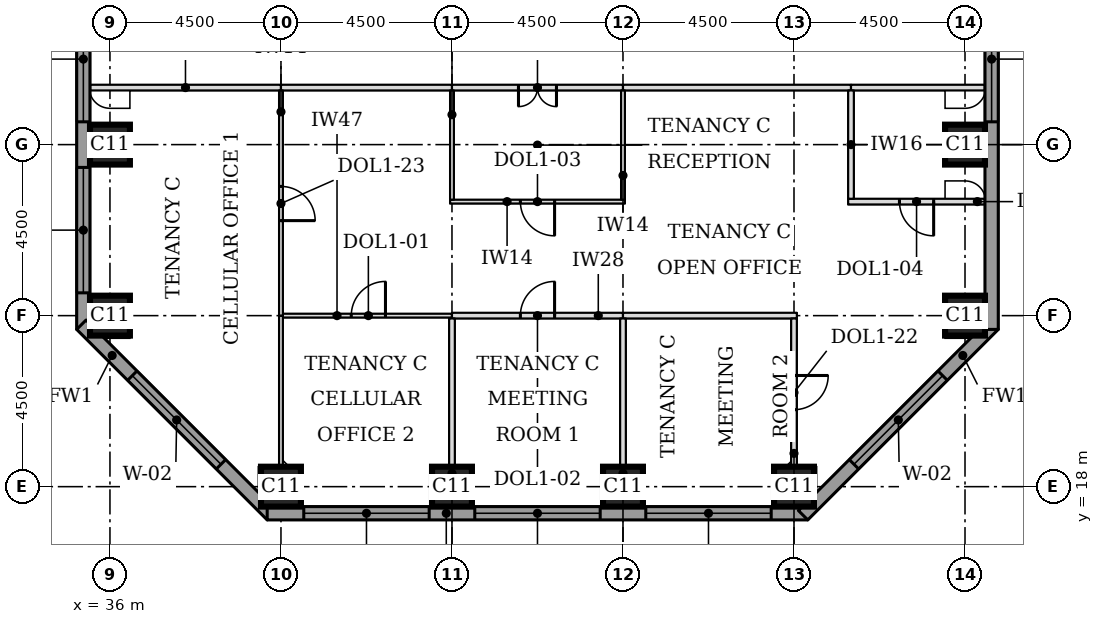
"""IFC4 building model, lengths in metres.
Left out: names, types, materials, properties, quantities, classifications, styles, units other than length and angle.
Written with IfcOpenShell. Run it as: python <this file> out.ifc"""

import sys

from ifc_helpers import new_model, si_unit, direction, frame, frame_2d, origin, origin_2d, place, context, subcontext, project, spatial, rectangle, extrude, element, fill, save


model = new_model("IFC4")
c1 = context("Model", 3, precision=1e-05, world=origin(), true_north=direction((0.0, 1.0)))
c2 = subcontext(c1, "Body", "Model", "MODEL_VIEW")
j1 = project(units=[si_unit("LENGTHUNIT", "METRE"), si_unit("PLANEANGLEUNIT", "RADIAN")], contexts=[c1])
p1 = place(None, origin())
s1 = spatial("IfcSite", under=j1, at=p1, CompositionType="ELEMENT")
p2 = place(p1, origin())
s2 = spatial("IfcBuilding", under=s1, at=p2, CompositionType="ELEMENT")
p3 = place(p2, frame((0.0, 0.0, 78.9)))
s3 = spatial("IfcBuildingStorey", under=s2, at=p3, CompositionType="ELEMENT", Elevation=78.9)
for number, where, z_axis, x_axis in (
    (1, (40.5, 18.0, 0.0), (0.0, 0.0, 1.0), (1.0, 0.0, 0.0)),
    (2, (45.0, 18.0, 0.0), (0.0, 0.0, 1.0), (1.0, 0.0, 0.0)),
    (3, (49.5, 18.0, 0.0), (0.0, 0.0, 1.0), (1.0, 0.0, 0.0)),
    (4, (54.0, 18.0, 0.0), (0.0, 0.0, 1.0), (1.0, 0.0, 0.0)),
    (5, (36.0, 22.5, 0.0), (0.0, 0.0, 1.0), (1.0, 0.0, 0.0)),
    (6, (58.5, 22.5, 0.0), (0.0, 0.0, 1.0), (1.0, 0.0, 0.0)),
    (7, (36.0, 27.0, 0.0), (0.0, 0.0, 1.0), (1.0, 0.0, 0.0)),
    (8, (58.5, 27.0, 0.0), (0.0, 0.0, 1.0), (1.0, 0.0, 0.0)),
):
    element("IfcColumn", number, at=place(p3, frame(where, z_axis=z_axis, x_axis=x_axis)), inside=s3, PredefinedType="COLUMN", context=c2, shape_type="SweptSolid", body=[
        extrude(rectangle(XDim=1.05, YDim=1.05, at=origin_2d()), origin(), (0.0, 0.0, 1.0), 3.7),
    ])
p4 = place(p3, frame((35.3, 39.975, 0.0), z_axis=(0.0, 0.0, 1.0), x_axis=(0.0, -1.0, 0.0)))
e9 = element("IfcWall", 9, at=p4, inside=s3, PredefinedType="STANDARD", context=c2, shape_type="SweptSolid", body=[
    extrude(rectangle(XDim=17.837, YDim=0.35, at=frame_2d((8.919, 0.0))), origin(), (0.0, 0.0, 1.0), 3.525),
])
p5 = place(p4, frame((0.5, 0.0, 0.9)))
e10 = element("IfcOpeningElement", 10, at=p5, cuts=e9, PredefinedType="OPENING", context=c2, shape_type="SweptSolid", body=[
    extrude(rectangle(XDim=3.3, YDim=1.9, at=frame_2d((1.65, 0.95))), frame((0.0, 0.185, 0.0), z_axis=(0.0, -1.0, 0.0), x_axis=(1.0, 0.0, 0.0)), (0.0, 0.0, 1.0), 0.37),
])
p6 = place(p4, frame((4.575, 0.0, 0.9)))
e11 = element("IfcOpeningElement", 11, at=p6, cuts=e9, PredefinedType="OPENING", context=c2, shape_type="SweptSolid", body=[
    extrude(rectangle(XDim=3.3, YDim=1.9, at=frame_2d((1.65, 0.95))), frame((0.0, 0.185, 0.0), z_axis=(0.0, -1.0, 0.0), x_axis=(1.0, 0.0, 0.0)), (0.0, 0.0, 1.0), 0.37),
])
p7 = place(p4, frame((9.075, 0.0, 0.9)))
e12 = element("IfcOpeningElement", 12, at=p7, cuts=e9, PredefinedType="OPENING", context=c2, shape_type="SweptSolid", body=[
    extrude(rectangle(XDim=3.3, YDim=1.9, at=frame_2d((1.65, 0.95))), frame((0.0, 0.185, 0.0), z_axis=(0.0, -1.0, 0.0), x_axis=(1.0, 0.0, 0.0)), (0.0, 0.0, 1.0), 0.37),
])
p8 = place(p4, frame((13.575, 0.0, 0.9)))
e13 = element("IfcOpeningElement", 13, at=p8, cuts=e9, PredefinedType="OPENING", context=c2, shape_type="SweptSolid", body=[
    extrude(rectangle(XDim=3.3, YDim=1.9, at=frame_2d((1.65, 0.95))), frame((0.0, 0.185, 0.0), z_axis=(0.0, -1.0, 0.0), x_axis=(1.0, 0.0, 0.0)), (0.0, 0.0, 1.0), 0.37),
])
p9 = place(p3, frame((35.249, 22.261, 0.0), z_axis=(0.0, 0.0, 1.0), x_axis=(0.707106781187, -0.707106781187, 0.0)))
e14 = element("IfcWall", 14, at=p9, inside=s3, PredefinedType="STANDARD", context=c2, shape_type="SweptSolid", body=[
    extrude(rectangle(XDim=7.089, YDim=0.35, at=frame_2d((3.544, 0.0))), origin(), (0.0, 0.0, 1.0), 3.525),
])
p10 = place(p9, frame((1.894, 0.0, 0.9)))
e15 = element("IfcOpeningElement", 15, at=p10, cuts=e14, PredefinedType="OPENING", context=c2, shape_type="SweptSolid", body=[
    extrude(rectangle(XDim=3.3, YDim=1.9, at=frame_2d((1.65, 0.95))), frame((0.0, 0.185, 0.0), z_axis=(0.0, -1.0, 0.0), x_axis=(1.0, 0.0, 0.0)), (0.0, 0.0, 1.0), 0.37),
])
p11 = place(p3, frame((40.138, 17.3, 0.0), z_axis=(0.0, 0.0, 1.0), x_axis=(1.0, 0.0, 0.0)))
e16 = element("IfcWall", 16, at=p11, inside=s3, PredefinedType="STANDARD", context=c2, shape_type="SweptSolid", body=[
    extrude(rectangle(XDim=14.225, YDim=0.35, at=frame_2d((7.112, 0.0))), origin(), (0.0, 0.0, 1.0), 3.525),
])
p12 = place(p11, frame((0.962, 0.0, 0.9)))
e17 = element("IfcOpeningElement", 17, at=p12, cuts=e16, PredefinedType="OPENING", context=c2, shape_type="SweptSolid", body=[
    extrude(rectangle(XDim=3.3, YDim=1.9, at=frame_2d((1.65, 0.95))), frame((0.0, 0.185, 0.0), z_axis=(0.0, -1.0, 0.0), x_axis=(1.0, 0.0, 0.0)), (0.0, 0.0, 1.0), 0.37),
])
p13 = place(p11, frame((5.462, 0.0, 0.9)))
e18 = element("IfcOpeningElement", 18, at=p13, cuts=e16, PredefinedType="OPENING", context=c2, shape_type="SweptSolid", body=[
    extrude(rectangle(XDim=3.3, YDim=1.9, at=frame_2d((1.65, 0.95))), frame((0.0, 0.185, 0.0), z_axis=(0.0, -1.0, 0.0), x_axis=(1.0, 0.0, 0.0)), (0.0, 0.0, 1.0), 0.37),
])
p14 = place(p11, frame((9.962, 0.0, 0.9)))
e19 = element("IfcOpeningElement", 19, at=p14, cuts=e16, PredefinedType="OPENING", context=c2, shape_type="SweptSolid", body=[
    extrude(rectangle(XDim=3.3, YDim=1.9, at=frame_2d((1.65, 0.95))), frame((0.0, 0.185, 0.0), z_axis=(0.0, -1.0, 0.0), x_axis=(1.0, 0.0, 0.0)), (0.0, 0.0, 1.0), 0.37),
])
p15 = place(p3, frame((54.239, 17.249, 0.0), z_axis=(0.0, 0.0, 1.0), x_axis=(0.707106781187, 0.707106781187, 0.0)))
e20 = element("IfcWall", 20, at=p15, inside=s3, PredefinedType="STANDARD", context=c2, shape_type="SweptSolid", body=[
    extrude(rectangle(XDim=7.089, YDim=0.35, at=frame_2d((3.544, 0.0))), origin(), (0.0, 0.0, 1.0), 3.525),
])
p16 = place(p15, frame((1.894, 0.0, 0.9)))
e21 = element("IfcOpeningElement", 21, at=p16, cuts=e20, PredefinedType="OPENING", context=c2, shape_type="SweptSolid", body=[
    extrude(rectangle(XDim=3.3, YDim=1.9, at=frame_2d((1.65, 0.95))), frame((0.0, 0.185, 0.0), z_axis=(0.0, -1.0, 0.0), x_axis=(1.0, 0.0, 0.0)), (0.0, 0.0, 1.0), 0.37),
])
p17 = place(p3, frame((59.2, 22.138, 0.0), z_axis=(0.0, 0.0, 1.0), x_axis=(0.0, 1.0, 0.0)))
e22 = element("IfcWall", 22, at=p17, inside=s3, PredefinedType="STANDARD", context=c2, shape_type="SweptSolid", body=[
    extrude(rectangle(XDim=17.837, YDim=0.35, at=frame_2d((8.919, 0.0))), origin(), (0.0, 0.0, 1.0), 3.525),
])
p18 = place(p17, frame((5.462, 0.0, 0.9)))
e23 = element("IfcOpeningElement", 23, at=p18, cuts=e22, PredefinedType="OPENING", context=c2, shape_type="SweptSolid", body=[
    extrude(rectangle(XDim=3.3, YDim=1.9, at=frame_2d((1.65, 0.95))), frame((0.0, 0.185, 0.0), z_axis=(0.0, -1.0, 0.0), x_axis=(1.0, 0.0, 0.0)), (0.0, 0.0, 1.0), 0.37),
])
p19 = place(p17, frame((14.037, 0.0, 0.9)))
e24 = element("IfcOpeningElement", 24, at=p19, cuts=e22, PredefinedType="OPENING", context=c2, shape_type="SweptSolid", body=[
    extrude(rectangle(XDim=3.3, YDim=1.9, at=frame_2d((1.65, 0.95))), frame((0.0, 0.185, 0.0), z_axis=(0.0, -1.0, 0.0), x_axis=(1.0, 0.0, 0.0)), (0.0, 0.0, 1.0), 0.37),
])
p20 = place(p3, frame((40.55, 22.5, 0.0), z_axis=(0.0, 0.0, 1.0), x_axis=(1.0, 0.0, 0.0)))
e25 = element("IfcWall", 25, at=p20, inside=s3, PredefinedType="PARTITIONING", context=c2, shape_type="SweptSolid", body=[
    extrude(rectangle(XDim=4.45, YDim=0.1, at=frame_2d((2.225, 0.0))), origin(), (0.0, 0.0, 1.0), 2.55),
])
p21 = place(p20, frame((1.8, 0.0, 0.0)))
e26 = element("IfcOpeningElement", 26, at=p21, cuts=e25, PredefinedType="OPENING", context=c2, shape_type="SweptSolid", body=[
    extrude(rectangle(XDim=0.9, YDim=2.1, at=frame_2d((0.45, 1.05))), frame((0.0, 0.06, 0.0), z_axis=(0.0, -1.0, 0.0), x_axis=(1.0, 0.0, 0.0)), (0.0, 0.0, 1.0), 0.12),
])
p22 = place(p3, frame((45.0, 22.5, 0.0), z_axis=(0.0, 0.0, 1.0), x_axis=(1.0, 0.0, 0.0)))
e27 = element("IfcWall", 27, at=p22, inside=s3, PredefinedType="PARTITIONING", context=c2, shape_type="SweptSolid", body=[
    extrude(rectangle(XDim=4.5, YDim=0.15, at=frame_2d((2.25, 0.0))), origin(), (0.0, 0.0, 1.0), 2.55),
])
p23 = place(p22, frame((1.8, 0.0, 0.0)))
e28 = element("IfcOpeningElement", 28, at=p23, cuts=e27, PredefinedType="OPENING", context=c2, shape_type="SweptSolid", body=[
    extrude(rectangle(XDim=0.9, YDim=2.1, at=frame_2d((0.45, 1.05))), frame((0.0, 0.085, 0.0), z_axis=(0.0, -1.0, 0.0), x_axis=(1.0, 0.0, 0.0)), (0.0, 0.0, 1.0), 0.17),
])
p24 = place(p3, frame((49.5, 22.5, 0.0), z_axis=(0.0, 0.0, 1.0), x_axis=(1.0, 0.0, 0.0)))
e29 = element("IfcWall", 29, at=p24, inside=s3, PredefinedType="PARTITIONING", context=c2, shape_type="SweptSolid", body=[
    extrude(rectangle(XDim=4.575, YDim=0.15, at=frame_2d((2.288, 0.0))), origin(), (0.0, 0.0, 1.0), 2.55),
])
p25 = place(p3, frame((44.95, 25.5, 0.0), z_axis=(0.0, 0.0, 1.0), x_axis=(1.0, 0.0, 0.0)))
e30 = element("IfcWall", 30, at=p25, inside=s3, PredefinedType="PARTITIONING", context=c2, shape_type="SweptSolid", body=[
    extrude(rectangle(XDim=4.6, YDim=0.1, at=frame_2d((2.3, 0.0))), origin(), (0.0, 0.0, 1.0), 3.55),
])
p26 = place(p25, frame((1.85, 0.0, 0.0)))
e31 = element("IfcOpeningElement", 31, at=p26, cuts=e30, PredefinedType="OPENING", context=c2, shape_type="SweptSolid", body=[
    extrude(rectangle(XDim=0.9, YDim=2.1, at=frame_2d((0.45, 1.05))), frame((0.0, 0.06, 0.0), z_axis=(0.0, -1.0, 0.0), x_axis=(1.0, 0.0, 0.0)), (0.0, 0.0, 1.0), 0.12),
])
p27 = place(p3, frame((55.425, 25.5, 0.0), z_axis=(0.0, 0.0, 1.0), x_axis=(1.0, 0.0, 0.0)))
e32 = element("IfcWall", 32, at=p27, inside=s3, PredefinedType="PARTITIONING", context=c2, shape_type="SweptSolid", body=[
    extrude(rectangle(XDim=3.6, YDim=0.15, at=frame_2d((1.8, 0.0))), origin(), (0.0, 0.0, 1.0), 3.55),
])
p28 = place(p27, frame((1.35, 0.0, 0.0)))
e33 = element("IfcOpeningElement", 33, at=p28, cuts=e32, PredefinedType="OPENING", context=c2, shape_type="SweptSolid", body=[
    extrude(rectangle(XDim=0.9, YDim=2.1, at=frame_2d((0.45, 1.05))), frame((0.0, 0.085, 0.0), z_axis=(0.0, -1.0, 0.0), x_axis=(1.0, 0.0, 0.0)), (0.0, 0.0, 1.0), 0.17),
])
p29 = place(p3, frame((35.475, 28.5, 0.0), z_axis=(0.0, 0.0, 1.0), x_axis=(1.0, 0.0, 0.0)))
e34 = element("IfcWall", 34, at=p29, inside=s3, PredefinedType="PARTITIONING", context=c2, shape_type="SweptSolid", body=[
    extrude(rectangle(XDim=5.025, YDim=0.15, at=frame_2d((2.512, 0.0))), origin(), (0.0, 0.0, 1.0), 3.55),
])
p30 = place(p3, frame((40.5, 28.5, 0.0), z_axis=(0.0, 0.0, 1.0), x_axis=(1.0, 0.0, 0.0)))
e35 = element("IfcWall", 35, at=p30, inside=s3, PredefinedType="PARTITIONING", context=c2, shape_type="SweptSolid", body=[
    extrude(rectangle(XDim=4.5, YDim=0.15, at=frame_2d((2.25, 0.0))), origin(), (0.0, 0.0, 1.0), 3.55),
])
p31 = place(p3, frame((45.0, 28.5, 0.0), z_axis=(0.0, 0.0, 1.0), x_axis=(1.0, 0.0, 0.0)))
e36 = element("IfcWall", 36, at=p31, inside=s3, PredefinedType="PARTITIONING", context=c2, shape_type="SweptSolid", body=[
    extrude(rectangle(XDim=4.5, YDim=0.15, at=frame_2d((2.25, 0.0))), origin(), (0.0, 0.0, 1.0), 3.55),
])
p32 = place(p31, frame((1.75, 0.0, 0.0)))
e37 = element("IfcOpeningElement", 37, at=p32, cuts=e36, PredefinedType="OPENING", context=c2, shape_type="SweptSolid", body=[
    extrude(rectangle(XDim=1.0, YDim=2.1, at=frame_2d((0.5, 1.05))), frame((0.0, 0.085, 0.0), z_axis=(0.0, -1.0, 0.0), x_axis=(1.0, 0.0, 0.0)), (0.0, 0.0, 1.0), 0.17),
])
p33 = place(p3, frame((49.5, 28.5, 0.0), z_axis=(0.0, 0.0, 1.0), x_axis=(1.0, 0.0, 0.0)))
e38 = element("IfcWall", 38, at=p33, inside=s3, PredefinedType="PARTITIONING", context=c2, shape_type="SweptSolid", body=[
    extrude(rectangle(XDim=6.0, YDim=0.15, at=frame_2d((3.0, 0.0))), origin(), (0.0, 0.0, 1.0), 3.55),
])
p34 = place(p3, frame((55.5, 28.5, 0.0), z_axis=(0.0, 0.0, 1.0), x_axis=(1.0, 0.0, 0.0)))
e39 = element("IfcWall", 39, at=p34, inside=s3, PredefinedType="PARTITIONING", context=c2, shape_type="SweptSolid", body=[
    extrude(rectangle(XDim=3.525, YDim=0.15, at=frame_2d((1.762, 0.0))), origin(), (0.0, 0.0, 1.0), 3.55),
])
for number, where, z_axis, x_axis in (
    (40, (45.0, 17.475, 0.0), (0.0, 0.0, 1.0), (0.0, 1.0, 0.0)),
    (41, (49.5, 17.475, 0.0), (0.0, 0.0, 1.0), (0.0, 1.0, 0.0)),
):
    element("IfcWall", number, at=place(p3, frame(where, z_axis=z_axis, x_axis=x_axis)), inside=s3, PredefinedType="PARTITIONING", context=c2, shape_type="SweptSolid", body=[
        extrude(rectangle(XDim=4.95, YDim=0.15, at=frame_2d((2.475, 0.0))), origin(), (0.0, 0.0, 1.0), 3.55),
    ])
p35 = place(p3, frame((40.5, 18.525, 0.0), z_axis=(0.0, 0.0, 1.0), x_axis=(0.0, 1.0, 0.0)))
e42 = element("IfcWall", 42, at=p35, inside=s3, PredefinedType="PARTITIONING", context=c2, shape_type="SweptSolid", body=[
    extrude(rectangle(XDim=3.975, YDim=0.1, at=frame_2d((1.988, 0.0))), origin(), (0.0, 0.0, 1.0), 3.55),
])
p36 = place(p3, frame((54.0, 18.525, 0.0), z_axis=(0.0, 0.0, 1.0), x_axis=(0.0, 1.0, 0.0)))
e43 = element("IfcWall", 43, at=p36, inside=s3, PredefinedType="PARTITIONING", context=c2, shape_type="SweptSolid", body=[
    extrude(rectangle(XDim=3.9, YDim=0.15, at=frame_2d((1.95, 0.0))), origin(), (0.0, 0.0, 1.0), 3.55),
])
p37 = place(p36, frame((1.5, 0.0, 0.0)))
e44 = element("IfcOpeningElement", 44, at=p37, cuts=e43, PredefinedType="OPENING", context=c2, shape_type="SweptSolid", body=[
    extrude(rectangle(XDim=0.9, YDim=2.1, at=frame_2d((0.45, 1.05))), frame((0.0, 0.085, 0.0), z_axis=(0.0, -1.0, 0.0), x_axis=(1.0, 0.0, 0.0)), (0.0, 0.0, 1.0), 0.17),
])
p38 = place(p3, frame((40.5, 22.5, 0.0), z_axis=(0.0, 0.0, 1.0), x_axis=(0.0, 1.0, 0.0)))
e45 = element("IfcWall", 45, at=p38, inside=s3, PredefinedType="PARTITIONING", context=c2, shape_type="SweptSolid", body=[
    extrude(rectangle(XDim=5.925, YDim=0.1, at=frame_2d((2.962, 0.0))), origin(), (0.0, 0.0, 1.0), 3.55),
])
p39 = place(p38, frame((2.5, 0.0, 0.0)))
e46 = element("IfcOpeningElement", 46, at=p39, cuts=e45, PredefinedType="OPENING", context=c2, shape_type="SweptSolid", body=[
    extrude(rectangle(XDim=0.9, YDim=2.1, at=frame_2d((0.45, 1.05))), frame((0.0, 0.06, 0.0), z_axis=(0.0, -1.0, 0.0), x_axis=(1.0, 0.0, 0.0)), (0.0, 0.0, 1.0), 0.12),
])
for number, where, z_axis, x_axis in (
    (47, (45.0, 25.55, 0.0), (0.0, 0.0, 1.0), (0.0, 1.0, 0.0)),
    (48, (49.5, 25.55, 0.0), (0.0, 0.0, 1.0), (0.0, 1.0, 0.0)),
):
    element("IfcWall", number, at=place(p3, frame(where, z_axis=z_axis, x_axis=x_axis)), inside=s3, PredefinedType="PARTITIONING", context=c2, shape_type="SweptSolid", body=[
        extrude(rectangle(XDim=2.875, YDim=0.1, at=frame_2d((1.438, 0.0))), origin(), (0.0, 0.0, 1.0), 3.55),
    ])
p40 = place(p3, frame((55.5, 25.575, 0.0), z_axis=(0.0, 0.0, 1.0), x_axis=(0.0, 1.0, 0.0)))
e49 = element("IfcWall", 49, at=p40, inside=s3, PredefinedType="PARTITIONING", context=c2, shape_type="SweptSolid", body=[
    extrude(rectangle(XDim=2.85, YDim=0.15, at=frame_2d((1.425, 0.0))), origin(), (0.0, 0.0, 1.0), 3.55),
])
p41 = place(p7, origin())
e50 = element("IfcWindow", 50, at=p41, inside=s3, PartitioningType="SINGLE_PANEL", PredefinedType="WINDOW", context=c2, shape_type="SweptSolid", body=[
    extrude(rectangle(XDim=3.3, YDim=1.9, at=frame_2d((1.65, 0.95))), frame((0.0, 0.085, 0.0), z_axis=(0.0, -1.0, 0.0), x_axis=(1.0, 0.0, 0.0)), (0.0, 0.0, 1.0), 0.06),
])
fill(e12, e50)
p42 = place(p8, origin())
e51 = element("IfcWindow", 51, at=p42, inside=s3, PartitioningType="SINGLE_PANEL", PredefinedType="WINDOW", context=c2, shape_type="SweptSolid", body=[
    extrude(rectangle(XDim=3.3, YDim=1.9, at=frame_2d((1.65, 0.95))), frame((0.0, 0.085, 0.0), z_axis=(0.0, -1.0, 0.0), x_axis=(1.0, 0.0, 0.0)), (0.0, 0.0, 1.0), 0.06),
])
fill(e13, e51)
p43 = place(p10, origin())
e52 = element("IfcWindow", 52, at=p43, inside=s3, PartitioningType="SINGLE_PANEL", PredefinedType="WINDOW", context=c2, shape_type="SweptSolid", body=[
    extrude(rectangle(XDim=3.3, YDim=1.9, at=frame_2d((1.65, 0.95))), frame((0.0, 0.085, 0.0), z_axis=(0.0, -1.0, 0.0), x_axis=(1.0, 0.0, 0.0)), (0.0, 0.0, 1.0), 0.06),
])
fill(e15, e52)
p44 = place(p12, origin())
e53 = element("IfcWindow", 53, at=p44, inside=s3, PartitioningType="SINGLE_PANEL", PredefinedType="WINDOW", context=c2, shape_type="SweptSolid", body=[
    extrude(rectangle(XDim=3.3, YDim=1.9, at=frame_2d((1.65, 0.95))), frame((0.0, 0.085, 0.0), z_axis=(0.0, -1.0, 0.0), x_axis=(1.0, 0.0, 0.0)), (0.0, 0.0, 1.0), 0.06),
])
fill(e17, e53)
p45 = place(p13, origin())
e54 = element("IfcWindow", 54, at=p45, inside=s3, PartitioningType="SINGLE_PANEL", PredefinedType="WINDOW", context=c2, shape_type="SweptSolid", body=[
    extrude(rectangle(XDim=3.3, YDim=1.9, at=frame_2d((1.65, 0.95))), frame((0.0, 0.085, 0.0), z_axis=(0.0, -1.0, 0.0), x_axis=(1.0, 0.0, 0.0)), (0.0, 0.0, 1.0), 0.06),
])
fill(e18, e54)
p46 = place(p14, origin())
e55 = element("IfcWindow", 55, at=p46, inside=s3, PartitioningType="SINGLE_PANEL", PredefinedType="WINDOW", context=c2, shape_type="SweptSolid", body=[
    extrude(rectangle(XDim=3.3, YDim=1.9, at=frame_2d((1.65, 0.95))), frame((0.0, 0.085, 0.0), z_axis=(0.0, -1.0, 0.0), x_axis=(1.0, 0.0, 0.0)), (0.0, 0.0, 1.0), 0.06),
])
fill(e19, e55)
p47 = place(p16, origin())
e56 = element("IfcWindow", 56, at=p47, inside=s3, PartitioningType="SINGLE_PANEL", PredefinedType="WINDOW", context=c2, shape_type="SweptSolid", body=[
    extrude(rectangle(XDim=3.3, YDim=1.9, at=frame_2d((1.65, 0.95))), frame((0.0, 0.085, 0.0), z_axis=(0.0, -1.0, 0.0), x_axis=(1.0, 0.0, 0.0)), (0.0, 0.0, 1.0), 0.06),
])
fill(e21, e56)
p48 = place(p18, origin())
e57 = element("IfcWindow", 57, at=p48, inside=s3, PartitioningType="SINGLE_PANEL", PredefinedType="WINDOW", context=c2, shape_type="SweptSolid", body=[
    extrude(rectangle(XDim=3.3, YDim=1.9, at=frame_2d((1.65, 0.95))), frame((0.0, 0.085, 0.0), z_axis=(0.0, -1.0, 0.0), x_axis=(1.0, 0.0, 0.0)), (0.0, 0.0, 1.0), 0.06),
])
fill(e23, e57)
p49 = place(p32, frame((1.0, 0.0, 0.0), z_axis=(0.0, 0.0, 1.0), x_axis=(-1.0, 0.0, 0.0)))
e58 = element("IfcDoor", 58, at=p49, inside=s3, OperationType="DOUBLE_DOOR_SINGLE_SWING", PredefinedType="DOOR", context=c2, shape_type="SweptSolid", body=[
    extrude(rectangle(XDim=1.0, YDim=2.1, at=frame_2d((0.5, 1.05))), frame((0.0, 0.025, 0.0), z_axis=(0.0, -1.0, 0.0), x_axis=(1.0, 0.0, 0.0)), (0.0, 0.0, 1.0), 0.05),
])
fill(e37, e58)
p50 = place(p26, frame((0.9, 0.0, 0.0), z_axis=(0.0, 0.0, 1.0), x_axis=(-1.0, 0.0, 0.0)))
e59 = element("IfcDoor", 59, at=p50, inside=s3, OperationType="SINGLE_SWING_LEFT", PredefinedType="DOOR", context=c2, shape_type="SweptSolid", body=[
    extrude(rectangle(XDim=0.9, YDim=2.1, at=frame_2d((0.45, 1.05))), frame((0.0, 0.025, 0.0), z_axis=(0.0, -1.0, 0.0), x_axis=(1.0, 0.0, 0.0)), (0.0, 0.0, 1.0), 0.05),
])
fill(e31, e59)
p51 = place(p39, frame((0.9, 0.0, 0.0), z_axis=(0.0, 0.0, 1.0), x_axis=(-1.0, 0.0, 0.0)))
e60 = element("IfcDoor", 60, at=p51, inside=s3, OperationType="SINGLE_SWING_RIGHT", PredefinedType="DOOR", context=c2, shape_type="SweptSolid", body=[
    extrude(rectangle(XDim=0.9, YDim=2.1, at=frame_2d((0.45, 1.05))), frame((0.0, 0.025, 0.0), z_axis=(0.0, -1.0, 0.0), x_axis=(1.0, 0.0, 0.0)), (0.0, 0.0, 1.0), 0.05),
])
fill(e46, e60)
p52 = place(p21, origin())
e61 = element("IfcDoor", 61, at=p52, inside=s3, OperationType="SINGLE_SWING_RIGHT", PredefinedType="DOOR", context=c2, shape_type="SweptSolid", body=[
    extrude(rectangle(XDim=0.9, YDim=2.1, at=frame_2d((0.45, 1.05))), frame((0.0, 0.025, 0.0), z_axis=(0.0, -1.0, 0.0), x_axis=(1.0, 0.0, 0.0)), (0.0, 0.0, 1.0), 0.05),
])
fill(e26, e61)
p53 = place(p28, frame((0.9, 0.0, 0.0), z_axis=(0.0, 0.0, 1.0), x_axis=(-1.0, 0.0, 0.0)))
e62 = element("IfcDoor", 62, at=p53, inside=s3, OperationType="SINGLE_SWING_LEFT", PredefinedType="DOOR", context=c2, shape_type="SweptSolid", body=[
    extrude(rectangle(XDim=0.9, YDim=2.1, at=frame_2d((0.45, 1.05))), frame((0.0, 0.025, 0.0), z_axis=(0.0, -1.0, 0.0), x_axis=(1.0, 0.0, 0.0)), (0.0, 0.0, 1.0), 0.05),
])
fill(e33, e62)
p54 = place(p23, origin())
e63 = element("IfcDoor", 63, at=p54, inside=s3, OperationType="SINGLE_SWING_RIGHT", PredefinedType="DOOR", context=c2, shape_type="SweptSolid", body=[
    extrude(rectangle(XDim=0.9, YDim=2.1, at=frame_2d((0.45, 1.05))), frame((0.0, 0.025, 0.0), z_axis=(0.0, -1.0, 0.0), x_axis=(1.0, 0.0, 0.0)), (0.0, 0.0, 1.0), 0.05),
])
fill(e28, e63)
p55 = place(p37, frame((0.9, 0.0, 0.0), z_axis=(0.0, 0.0, 1.0), x_axis=(-1.0, 0.0, 0.0)))
e64 = element("IfcDoor", 64, at=p55, inside=s3, OperationType="SINGLE_SWING_LEFT", PredefinedType="DOOR", context=c2, shape_type="SweptSolid", body=[
    extrude(rectangle(XDim=0.9, YDim=2.1, at=frame_2d((0.45, 1.05))), frame((0.0, 0.025, 0.0), z_axis=(0.0, -1.0, 0.0), x_axis=(1.0, 0.0, 0.0)), (0.0, 0.0, 1.0), 0.05),
])
fill(e44, e64)
save(model, sys.argv[1])
